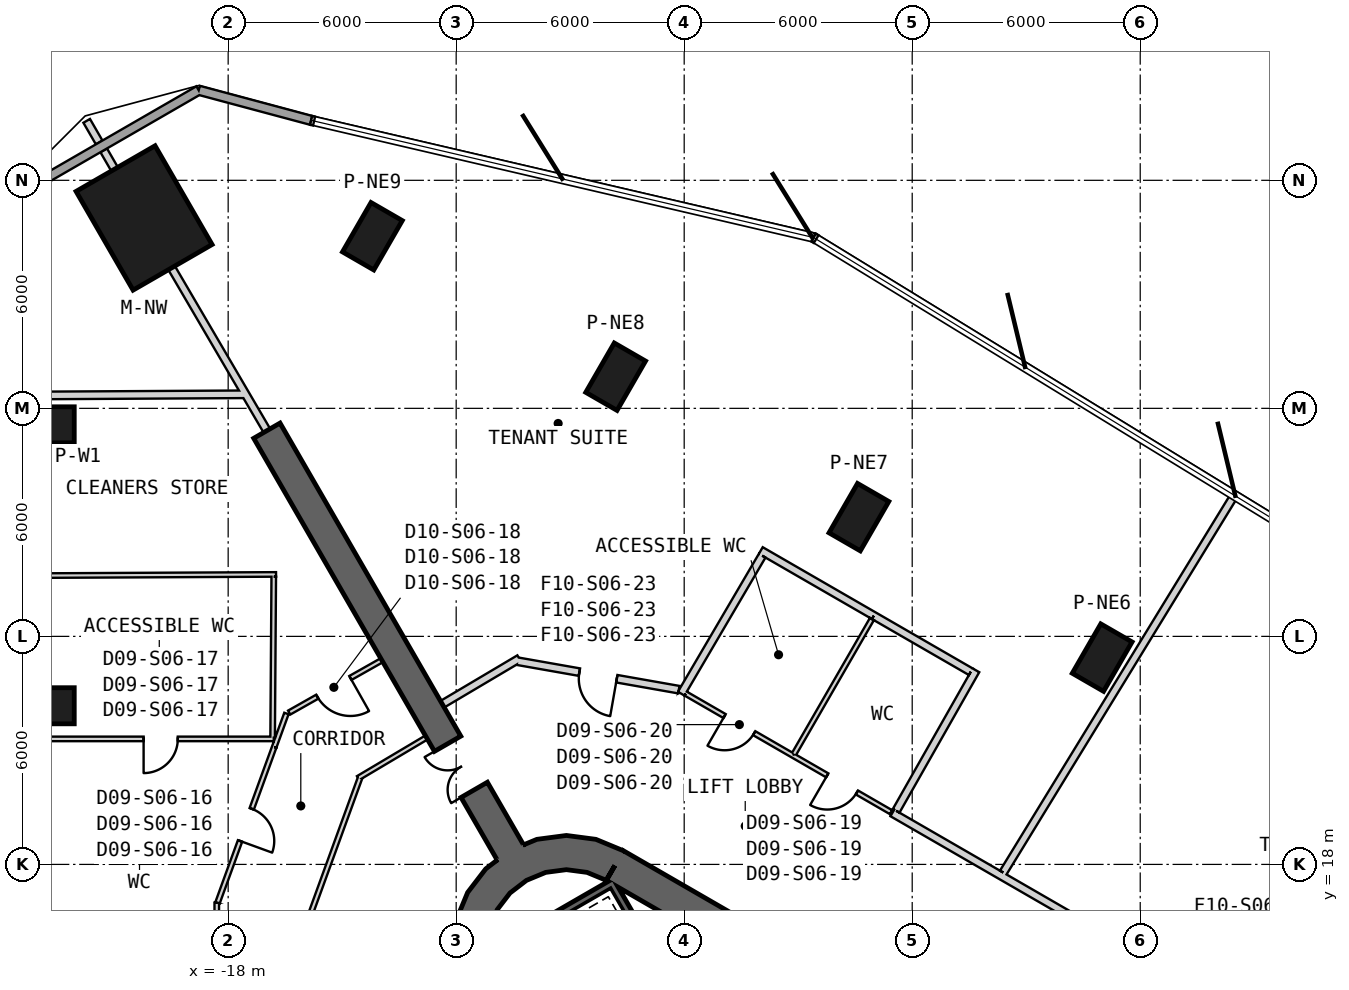
"""IFC4 building model, lengths in metres.
Left out: names, types, materials, properties, quantities, classifications, styles, units other than length and angle.
Written with IfcOpenShell. Run it as: python <this file> out.ifc"""

import sys

from ifc_helpers import new_model, si_unit, direction, frame, frame_2d, origin, origin_2d, place, context, subcontext, project, spatial, polyline, rectangle, outline, extrude, element, fill, save


model = new_model("IFC4")
c1 = context("Model", 3, precision=1e-05, world=origin(), true_north=direction((0.0, 1.0)))
c2 = subcontext(c1, "Body", "Model", "MODEL_VIEW")
j1 = project(units=[si_unit("LENGTHUNIT", "METRE"), si_unit("PLANEANGLEUNIT", "RADIAN")], contexts=[c1])
p1 = place(None, origin())
s1 = spatial("IfcSite", under=j1, at=p1, CompositionType="ELEMENT")
p2 = place(p1, origin())
s2 = spatial("IfcBuilding", under=s1, at=p2, CompositionType="ELEMENT")
p3 = place(p2, frame((0.0, 0.0, 119.3)))
s3 = spatial("IfcBuildingStorey", under=s2, at=p3, CompositionType="ELEMENT", Elevation=119.3)
p4 = place(p3, frame((-20.213, 35.01, 0.0), z_axis=(0.0, 0.0, 1.0), x_axis=(-0.5, 0.866025403784, 0.0)))
e1 = element("IfcColumn", 1, at=p4, inside=s3, PredefinedType="COLUMN", context=c2, shape_type="SweptSolid", body=[
    extrude(rectangle(XDim=3.0, YDim=2.4, at=origin_2d()), origin(), (0.0, 0.0, 1.0), 4.1),
])
for number, where, z_axis, x_axis in (
    (2, (-22.8, 29.566, 0.0), (0.0, 0.0, 1.0), (-1.0, 0.0, 0.0)),
    (3, (-22.8, 22.174, 0.0), (0.0, 0.0, 1.0), (-1.0, 0.0, 0.0)),
    (4, (4.999, 23.441, 0.0), (0.0, 0.0, 1.0), (0.5, 0.866, 0.0)),
    (5, (-1.402, 27.137, 0.0), (0.0, 0.0, 1.0), (0.5, 0.866, 0.0)),
    (6, (-7.803, 30.833, 0.0), (0.0, 0.0, 1.0), (0.5, 0.866, 0.0)),
    (7, (-14.205, 34.528, 0.0), (0.0, 0.0, 1.0), (0.5, 0.866, 0.0)),
):
    element("IfcColumn", number, at=place(p3, frame(where, z_axis=z_axis, x_axis=x_axis)), inside=s3, PredefinedType="COLUMN", context=c2, shape_type="SweptSolid", body=[
        extrude(rectangle(XDim=1.5, YDim=0.95, at=origin_2d()), origin(), (0.0, 0.0, 1.0), 4.1),
    ])
p5 = place(p3, frame((19.475, 2.208, 0.0), z_axis=(0.0, 0.0, 1.0), x_axis=(-0.866028369851, 0.499994862586, 0.0)))
e8 = element("IfcWall", 8, at=p5, inside=s3, PredefinedType="SHEAR", context=c2, shape_type="SweptSolid", body=[
    extrude(rectangle(XDim=31.523, YDim=0.9, at=frame_2d((15.762, 0.0))), origin(), (0.0, 0.0, 1.0), 4.1),
])
p6 = place(p5, frame((7.062, 0.0, 0.0)))
e9 = element("IfcOpeningElement", 9, at=p6, cuts=e8, PredefinedType="OPENING", context=c2, shape_type="SweptSolid", body=[
    extrude(rectangle(XDim=1.2, YDim=2.4, at=frame_2d((0.6, 1.2))), frame((0.0, 0.46, 0.0), z_axis=(0.0, -1.0, 0.0), x_axis=(1.0, 0.0, 0.0)), (0.0, 0.0, 1.0), 0.92),
])
p7 = place(p5, frame((9.762, 0.0, 0.0)))
e10 = element("IfcOpeningElement", 10, at=p7, cuts=e8, PredefinedType="OPENING", context=c2, shape_type="SweptSolid", body=[
    extrude(rectangle(XDim=1.2, YDim=2.4, at=frame_2d((0.6, 1.2))), frame((0.0, 0.46, 0.0), z_axis=(0.0, -1.0, 0.0), x_axis=(1.0, 0.0, 0.0)), (0.0, 0.0, 1.0), 0.92),
])
p8 = place(p5, frame((12.462, 0.0, 0.0)))
e11 = element("IfcOpeningElement", 11, at=p8, cuts=e8, PredefinedType="OPENING", context=c2, shape_type="SweptSolid", body=[
    extrude(rectangle(XDim=1.2, YDim=2.4, at=frame_2d((0.6, 1.2))), frame((0.0, 0.46, 0.0), z_axis=(0.0, -1.0, 0.0), x_axis=(1.0, 0.0, 0.0)), (0.0, 0.0, 1.0), 0.92),
])
p9 = place(p5, frame((15.162, 0.0, 0.0)))
e12 = element("IfcOpeningElement", 12, at=p9, cuts=e8, PredefinedType="OPENING", context=c2, shape_type="SweptSolid", body=[
    extrude(rectangle(XDim=1.2, YDim=2.4, at=frame_2d((0.6, 1.2))), frame((0.0, 0.46, 0.0), z_axis=(0.0, -1.0, 0.0), x_axis=(1.0, 0.0, 0.0)), (0.0, 0.0, 1.0), 0.92),
])
p10 = place(p5, frame((17.862, 0.0, 0.0)))
e13 = element("IfcOpeningElement", 13, at=p10, cuts=e8, PredefinedType="OPENING", context=c2, shape_type="SweptSolid", body=[
    extrude(rectangle(XDim=1.2, YDim=2.4, at=frame_2d((0.6, 1.2))), frame((0.0, 0.46, 0.0), z_axis=(0.0, -1.0, 0.0), x_axis=(1.0, 0.0, 0.0)), (0.0, 0.0, 1.0), 0.92),
])
p11 = place(p5, frame((20.562, 0.0, 0.0)))
e14 = element("IfcOpeningElement", 14, at=p11, cuts=e8, PredefinedType="OPENING", context=c2, shape_type="SweptSolid", body=[
    extrude(rectangle(XDim=1.2, YDim=2.4, at=frame_2d((0.6, 1.2))), frame((0.0, 0.46, 0.0), z_axis=(0.0, -1.0, 0.0), x_axis=(1.0, 0.0, 0.0)), (0.0, 0.0, 1.0), 0.92),
])
p12 = place(p5, frame((23.262, 0.0, 0.0)))
e15 = element("IfcOpeningElement", 15, at=p12, cuts=e8, PredefinedType="OPENING", context=c2, shape_type="SweptSolid", body=[
    extrude(rectangle(XDim=1.2, YDim=2.4, at=frame_2d((0.6, 1.2))), frame((0.0, 0.46, 0.0), z_axis=(0.0, -1.0, 0.0), x_axis=(1.0, 0.0, 0.0)), (0.0, 0.0, 1.0), 0.92),
])
p13 = place(p5, frame((3.612, 0.0, 0.0)))
e16 = element("IfcOpeningElement", 16, at=p13, cuts=e8, PredefinedType="OPENING", context=c2, shape_type="SweptSolid", body=[
    extrude(rectangle(XDim=1.2, YDim=2.4, at=frame_2d((0.6, 1.2))), frame((0.0, 0.46, 0.0), z_axis=(0.0, -1.0, 0.0), x_axis=(1.0, 0.0, 0.0)), (0.0, 0.0, 1.0), 0.92),
])
p14 = place(p5, frame((26.712, 0.0, 0.0)))
e17 = element("IfcOpeningElement", 17, at=p14, cuts=e8, PredefinedType="OPENING", context=c2, shape_type="SweptSolid", body=[
    extrude(rectangle(XDim=1.2, YDim=2.4, at=frame_2d((0.6, 1.2))), frame((0.0, 0.46, 0.0), z_axis=(0.0, -1.0, 0.0), x_axis=(1.0, 0.0, 0.0)), (0.0, 0.0, 1.0), 0.92),
])
p15 = place(p3, origin())
e18 = element("IfcWall", 18, at=p15, inside=s3, PredefinedType="SHEAR", context=c2, shape_type="SweptSolid", body=[
    extrude(outline(polyline([(-7.6, 18.36), (-8.323, 18.659), (-9.1, 18.762), (-9.876, 18.659), (-10.6, 18.36), (-11.221, 17.883), (-11.698, 17.262), (-11.998, 16.538), (-12.1, 15.762), (-11.2, 15.762), (-11.128, 16.305), (-10.919, 16.812), (-10.585, 17.247), (-10.15, 17.58), (-9.644, 17.79), (-9.1, 17.862), (-8.556, 17.79), (-8.05, 17.58), (-7.6, 18.36)])), origin(), (0.0, 0.0, 1.0), 4.1),
])
p16 = place(p3, frame((-10.575, 18.316, 0.0), z_axis=(0.0, 0.0, 1.0), x_axis=(-0.500008359956, 0.866020577108, 0.0)))
e19 = element("IfcWall", 19, at=p16, inside=s3, PredefinedType="SHEAR", context=c2, shape_type="SweptSolid", body=[
    extrude(rectangle(XDim=12.812, YDim=0.8, at=frame_2d((6.406, 0.0))), origin(), (0.0, 0.0, 1.0), 4.1),
])
p17 = place(p16, frame((1.9, 0.0, 0.0)))
e20 = element("IfcOpeningElement", 20, at=p17, cuts=e19, PredefinedType="OPENING", context=c2, shape_type="SweptSolid", body=[
    extrude(rectangle(XDim=1.4, YDim=2.4, at=frame_2d((0.7, 1.2))), frame((0.0, 0.41, 0.0), z_axis=(0.0, -1.0, 0.0), x_axis=(1.0, 0.0, 0.0)), (0.0, 0.0, 1.0), 0.82),
])
p18 = place(p3, frame((-15.817, 37.578, 0.0), z_axis=(0.0, 0.0, 1.0), x_axis=(-0.965920651814, 0.258838355735, 0.0)))
e21 = element("IfcWall", 21, at=p18, inside=s3, PredefinedType="SOLIDWALL", context=c2, shape_type="SweptSolid", body=[
    extrude(rectangle(XDim=3.063, YDim=0.24, at=frame_2d((1.531, 0.0))), origin(), (0.0, 0.0, 1.0), 3.8),
])
p19 = place(p3, frame((-18.775, 38.37, 0.0), z_axis=(0.0, 0.0, 1.0), x_axis=(-0.866031321059, -0.49998975084, 0.0)))
e22 = element("IfcWall", 22, at=p19, inside=s3, PredefinedType="SOLIDWALL", context=c2, shape_type="SweptSolid", body=[
    extrude(rectangle(XDim=5.851, YDim=0.24, at=frame_2d((2.925, 0.0))), origin(), (0.0, 0.0, 1.0), 3.8),
])
p20 = place(p3, frame((-7.818, 17.541, -0.3), z_axis=(0.0, 0.0, 1.0), x_axis=(-0.866044365799, -0.499967155389, 0.0)))
e23 = element("IfcWall", 23, at=p20, inside=s3, PredefinedType="SHEAR", context=c2, shape_type="SweptSolid", body=[
    extrude(rectangle(XDim=3.8, YDim=0.2, at=frame_2d((1.9, 0.0))), origin(), (0.0, 0.0, 1.0), 4.1),
])
p21 = place(p3, frame((-7.854, 17.405, -0.3), z_axis=(0.0, 0.0, 1.0), x_axis=(0.499997992926, -0.866026562566, 0.0)))
e24 = element("IfcWall", 24, at=p21, inside=s3, PredefinedType="SHEAR", context=c2, shape_type="SweptSolid", body=[
    extrude(rectangle(XDim=7.9, YDim=0.2, at=frame_2d((3.95, 0.0))), origin(), (0.0, 0.0, 1.0), 4.1),
])
p22 = place(p3, frame((-12.782, 21.339, 0.0), z_axis=(0.0, 0.0, 1.0), x_axis=(-0.859769901207, -0.510681619973, 0.0)))
e25 = element("IfcWall", 25, at=p22, inside=s3, PredefinedType="PARTITIONING", context=c2, shape_type="SweptSolid", body=[
    extrude(rectangle(XDim=2.093, YDim=0.12, at=frame_2d((1.046, 0.0))), origin(), (0.0, 0.0, 1.0), 3.8),
])
p23 = place(p3, frame((-14.528, 20.282, 0.0), z_axis=(0.0, 0.0, 1.0), x_axis=(-0.341969257767, -0.939711140054, 0.0)))
e26 = element("IfcWall", 26, at=p23, inside=s3, PredefinedType="PARTITIONING", context=c2, shape_type="SweptSolid", body=[
    extrude(rectangle(XDim=4.073, YDim=0.12, at=frame_2d((2.037, 0.0))), origin(), (0.0, 0.0, 1.0), 2.88),
])
p24 = place(p3, frame((-18.3, 16.994, 0.0), z_axis=(0.0, 0.0, 1.0), x_axis=(0.0, -1.0, 0.0)))
e27 = element("IfcWall", 27, at=p24, inside=s3, PredefinedType="PARTITIONING", context=c2, shape_type="SweptSolid", body=[
    extrude(rectangle(XDim=0.91, YDim=0.12, at=frame_2d((0.455, 0.0))), origin(), (0.0, 0.0, 1.0), 3.8),
])
p25 = place(p3, frame((-16.467, 21.97, 0.0), z_axis=(0.0, 0.0, 1.0), x_axis=(-0.341973086836, -0.939709746613, 0.0)))
e28 = element("IfcWall", 28, at=p25, inside=s3, PredefinedType="PARTITIONING", context=c2, shape_type="SweptSolid", body=[
    extrude(rectangle(XDim=0.937, YDim=0.12, at=frame_2d((0.469, 0.0))), origin(), (0.0, 0.0, 1.0), 2.88),
])
p26 = place(p3, frame((-16.788, 21.09, 0.0), z_axis=(0.0, 0.0, 1.0), x_axis=(-0.342035154905, -0.939687156882, 0.0)))
e29 = element("IfcWall", 29, at=p26, inside=s3, PredefinedType="PARTITIONING", context=c2, shape_type="SweptSolid", body=[
    extrude(rectangle(XDim=4.362, YDim=0.12, at=frame_2d((2.181, 0.0))), origin(), (0.0, 0.0, 1.0), 2.98),
])
p27 = place(p26, frame((1.731, 0.0, 0.0)))
e30 = element("IfcOpeningElement", 30, at=p27, cuts=e29, PredefinedType="OPENING", context=c2, shape_type="SweptSolid", body=[
    extrude(rectangle(XDim=0.9, YDim=2.1, at=frame_2d((0.45, 1.05))), frame((0.0, 0.07, 0.0), z_axis=(0.0, -1.0, 0.0), x_axis=(1.0, 0.0, 0.0)), (0.0, 0.0, 1.0), 0.14),
])
p28 = place(p3, frame((-13.956, 23.373, 0.0), z_axis=(0.0, 0.0, 1.0), x_axis=(-0.870551471841, -0.492077366757, 0.0)))
e31 = element("IfcWall", 31, at=p28, inside=s3, PredefinedType="PARTITIONING", context=c2, shape_type="SweptSolid", body=[
    extrude(rectangle(XDim=2.8, YDim=0.12, at=frame_2d((1.4, 0.0))), origin(), (0.0, 0.0, 1.0), 3.8),
])
p29 = place(p28, frame((0.95, 0.0, 0.0)))
e32 = element("IfcOpeningElement", 32, at=p29, cuts=e31, PredefinedType="OPENING", context=c2, shape_type="SweptSolid", body=[
    extrude(rectangle(XDim=1.0, YDim=2.1, at=frame_2d((0.5, 1.05))), frame((0.0, 0.07, 0.0), z_axis=(0.0, -1.0, 0.0), x_axis=(1.0, 0.0, 0.0)), (0.0, 0.0, 1.0), 0.14),
])
p30 = place(p3, frame((-10.339, 23.415, 0.0), z_axis=(0.0, 0.0, 1.0), x_axis=(-0.860316803263, -0.509759745393, 0.0)))
e33 = element("IfcWall", 33, at=p30, inside=s3, PredefinedType="PARTITIONING", context=c2, shape_type="SweptSolid", body=[
    extrude(rectangle(XDim=2.354, YDim=0.2, at=frame_2d((1.177, 0.0))), origin(), (0.0, 0.0, 1.0), 3.8),
])
p31 = place(p3, frame((-6.141, 22.598, 0.0), z_axis=(0.0, 0.0, 1.0), x_axis=(-0.984804622474, 0.173665930897, 0.0)))
e34 = element("IfcWall", 34, at=p31, inside=s3, PredefinedType="PARTITIONING", context=c2, shape_type="SweptSolid", body=[
    extrude(rectangle(XDim=4.316, YDim=0.2, at=frame_2d((2.158, 0.0))), origin(), (0.0, 0.0, 1.0), 2.88),
])
p32 = place(p31, frame((1.658, 0.0, 0.0)))
e35 = element("IfcOpeningElement", 35, at=p32, cuts=e34, PredefinedType="OPENING", context=c2, shape_type="SweptSolid", body=[
    extrude(rectangle(XDim=1.0, YDim=2.1, at=frame_2d((0.5, 1.05))), frame((0.0, 0.11, 0.0), z_axis=(0.0, -1.0, 0.0), x_axis=(1.0, 0.0, 0.0)), (0.0, 0.0, 1.0), 0.22),
])
p33 = place(p3, frame((22.727, 5.931, 0.0), z_axis=(0.0, 0.0, 1.0), x_axis=(-0.866024609098, 0.500001376435, 0.0)))
e36 = element("IfcWall", 36, at=p33, inside=s3, PredefinedType="PARTITIONING", context=c2, shape_type="SweptSolid", body=[
    extrude(rectangle(XDim=26.847, YDim=0.2, at=frame_2d((13.424, 0.0))), origin(), (0.0, 0.0, 1.0), 2.98),
])
p34 = place(p33, frame((16.578, 0.0, 0.0)))
e37 = element("IfcOpeningElement", 37, at=p34, cuts=e36, PredefinedType="OPENING", context=c2, shape_type="SweptSolid", body=[
    extrude(rectangle(XDim=1.0, YDim=2.1, at=frame_2d((0.5, 1.05))), frame((0.0, 0.11, 0.0), z_axis=(0.0, -1.0, 0.0), x_axis=(1.0, 0.0, 0.0)), (0.0, 0.0, 1.0), 0.22),
])
p35 = place(p33, frame((4.829, 0.0, 0.0)))
e38 = element("IfcOpeningElement", 38, at=p35, cuts=e36, PredefinedType="OPENING", context=c2, shape_type="SweptSolid", body=[
    extrude(rectangle(XDim=1.0, YDim=2.1, at=frame_2d((0.5, 1.05))), frame((0.0, 0.11, 0.0), z_axis=(0.0, -1.0, 0.0), x_axis=(1.0, 0.0, 0.0)), (0.0, 0.0, 1.0), 0.22),
])
p36 = place(p3, frame((-0.557, 19.375, 0.0), z_axis=(0.0, 0.0, 1.0), x_axis=(-0.866028486751, 0.499994660107, 0.0)))
e39 = element("IfcWall", 39, at=p36, inside=s3, PredefinedType="PARTITIONING", context=c2, shape_type="SweptSolid", body=[
    extrude(rectangle(XDim=2.976, YDim=0.12, at=frame_2d((1.488, 0.0))), origin(), (0.0, 0.0, 1.0), 3.08),
])
p37 = place(p36, frame((1.038, 0.0, 0.0)))
e40 = element("IfcOpeningElement", 40, at=p37, cuts=e39, PredefinedType="OPENING", context=c2, shape_type="SweptSolid", body=[
    extrude(rectangle(XDim=0.9, YDim=2.1, at=frame_2d((0.45, 1.05))), frame((0.0, 0.07, 0.0), z_axis=(0.0, -1.0, 0.0), x_axis=(1.0, 0.0, 0.0)), (0.0, 0.0, 1.0), 0.14),
])
p38 = place(p3, frame((-3.135, 20.863, 0.0), z_axis=(0.0, 0.0, 1.0), x_axis=(-0.866043587326, 0.49996850386, 0.0)))
e41 = element("IfcWall", 41, at=p38, inside=s3, PredefinedType="PARTITIONING", context=c2, shape_type="SweptSolid", body=[
    extrude(rectangle(XDim=3.264, YDim=0.12, at=frame_2d((1.632, 0.0))), origin(), (0.0, 0.0, 1.0), 2.98),
])
p39 = place(p38, frame((1.182, 0.0, 0.0)))
e42 = element("IfcOpeningElement", 42, at=p39, cuts=e41, PredefinedType="OPENING", context=c2, shape_type="SweptSolid", body=[
    extrude(rectangle(XDim=0.9, YDim=2.1, at=frame_2d((0.45, 1.05))), frame((0.0, 0.07, 0.0), z_axis=(0.0, -1.0, 0.0), x_axis=(1.0, 0.0, 0.0)), (0.0, 0.0, 1.0), 0.14),
])
p40 = place(p3, frame((-21.723, 37.565, 0.0), z_axis=(0.0, 0.0, 1.0), x_axis=(0.499862072928, -0.866105021373, 0.0)))
e43 = element("IfcWall", 43, at=p40, inside=s3, PredefinedType="PARTITIONING", context=c2, shape_type="SweptSolid", body=[
    extrude(rectangle(XDim=0.656, YDim=0.2, at=frame_2d((0.328, 0.0))), origin(), (0.0, 0.0, 1.0), 3.8),
])
p41 = place(p3, frame((-21.275, 36.789, 0.0), z_axis=(0.0, 0.0, 1.0), x_axis=(0.499857944771, -0.866107403877, 0.0)))
e44 = element("IfcWall", 44, at=p41, inside=s3, PredefinedType="PARTITIONING", context=c2, shape_type="SweptSolid", body=[
    extrude(rectangle(XDim=0.572, YDim=0.2, at=frame_2d((0.286, 0.0))), origin(), (0.0, 0.0, 1.0), 3.8),
])
p42 = place(p3, frame((-19.489, 33.696, 0.0), z_axis=(0.0, 0.0, 1.0), x_axis=(0.50520690072, -0.862998254613, 0.0)))
e45 = element("IfcWall", 45, at=p42, inside=s3, PredefinedType="PARTITIONING", context=c2, shape_type="SweptSolid", body=[
    extrude(rectangle(XDim=4.963, YDim=0.2, at=frame_2d((2.482, 0.0))), origin(), (0.0, 0.0, 1.0), 3.37),
])
p43 = place(p3, frame((-17.534, 30.37, 0.0), z_axis=(0.0, 0.0, 1.0), x_axis=(-0.999983869047, -0.00567993362, 0.0)))
e46 = element("IfcWall", 46, at=p43, inside=s3, PredefinedType="PARTITIONING", context=c2, shape_type="SweptSolid", body=[
    extrude(rectangle(XDim=5.416, YDim=0.2, at=frame_2d((2.708, 0.0))), origin(), (0.0, 0.0, 1.0), 3.37),
])
p44 = place(p3, frame((2.395, 17.785, 0.0), z_axis=(0.0, 0.0, 1.0), x_axis=(0.522409107214, 0.852694977527, 0.0)))
e47 = element("IfcWall", 47, at=p44, inside=s3, PredefinedType="PARTITIONING", context=c2, shape_type="SweptSolid", body=[
    extrude(rectangle(XDim=11.641, YDim=0.2, at=frame_2d((5.821, 0.0))), origin(), (0.0, 0.0, 1.0), 3.08),
])
p45 = place(p3, frame((-0.421, 19.411, 0.0), z_axis=(0.0, 0.0, 1.0), x_axis=(0.493854448618, 0.86954458401, 0.0)))
e48 = element("IfcWall", 48, at=p45, inside=s3, PredefinedType="PARTITIONING", context=c2, shape_type="SweptSolid", body=[
    extrude(rectangle(XDim=4.25, YDim=0.2, at=frame_2d((2.125, 0.0))), origin(), (0.0, 0.0, 1.0), 3.8),
])
p46 = place(p3, frame((-3.984, 26.26, 0.0), z_axis=(0.0, 0.0, 1.0), x_axis=(0.866016279763, -0.500015802937, 0.0)))
e49 = element("IfcWall", 49, at=p46, inside=s3, PredefinedType="PARTITIONING", context=c2, shape_type="SweptSolid", body=[
    extrude(rectangle(XDim=3.434, YDim=0.2, at=frame_2d((1.717, 0.0))), origin(), (0.0, 0.0, 1.0), 3.08),
])
p47 = place(p3, frame((-1.01, 24.543, 0.0), z_axis=(0.0, 0.0, 1.0), x_axis=(0.866036539348, -0.499980712142, 0.0)))
e50 = element("IfcWall", 50, at=p47, inside=s3, PredefinedType="PARTITIONING", context=c2, shape_type="SweptSolid", body=[
    extrude(rectangle(XDim=2.946, YDim=0.2, at=frame_2d((1.473, 0.0))), origin(), (0.0, 0.0, 1.0), 3.8),
])
p48 = place(p3, frame((-6.078, 22.493, 0.0), z_axis=(0.0, 0.0, 1.0), x_axis=(0.506079610092, 0.862486769898, 0.0)))
e51 = element("IfcWall", 51, at=p48, inside=s3, PredefinedType="PARTITIONING", context=c2, shape_type="SweptSolid", body=[
    extrude(rectangle(XDim=4.21, YDim=0.2, at=frame_2d((2.105, 0.0))), origin(), (0.0, 0.0, 1.0), 2.98),
])
p49 = place(p3, frame((-16.8, 21.302, 0.0), z_axis=(0.0, 0.0, 1.0), x_axis=(-1.0, 0.0, 0.0)))
e52 = element("IfcWall", 52, at=p49, inside=s3, PredefinedType="PARTITIONING", context=c2, shape_type="SweptSolid", body=[
    extrude(rectangle(XDim=5.95, YDim=0.12, at=frame_2d((2.975, 0.0))), origin(), (0.0, 0.0, 1.0), 2.98),
])
p50 = place(p49, frame((2.525, 0.0, 0.0)))
e53 = element("IfcOpeningElement", 53, at=p50, cuts=e52, PredefinedType="OPENING", context=c2, shape_type="SweptSolid", body=[
    extrude(rectangle(XDim=0.9, YDim=2.1, at=frame_2d((0.45, 1.05))), frame((0.0, 0.07, 0.0), z_axis=(0.0, -1.0, 0.0), x_axis=(1.0, 0.0, 0.0)), (0.0, 0.0, 1.0), 0.14),
])
p51 = place(p3, frame((-22.75, 25.6, 0.0), z_axis=(0.0, 0.0, 1.0), x_axis=(0.999987719631, 0.004955863907, 0.0)))
e54 = element("IfcWall", 54, at=p51, inside=s3, PredefinedType="PARTITIONING", context=c2, shape_type="SweptSolid", body=[
    extrude(rectangle(XDim=6.01, YDim=0.12, at=frame_2d((3.005, 0.0))), origin(), (0.0, 0.0, 1.0), 2.88),
])
p52 = place(p3, frame((-16.83, 21.332, 0.0), z_axis=(0.0, 0.0, 1.0), x_axis=(0.006971081403, 0.999975701717, 0.0)))
e55 = element("IfcWall", 55, at=p52, inside=s3, PredefinedType="PARTITIONING", context=c2, shape_type="SweptSolid", body=[
    extrude(rectangle(XDim=4.238, YDim=0.12, at=frame_2d((2.119, 0.0))), origin(), (0.0, 0.0, 1.0), 2.88),
])
p53 = place(p3, frame((-3.105, 20.914, 0.0), z_axis=(0.0, 0.0, 1.0), x_axis=(0.499965302165, 0.866045435662, 0.0)))
e56 = element("IfcWall", 56, at=p53, inside=s3, PredefinedType="PARTITIONING", context=c2, shape_type="SweptSolid", body=[
    extrude(rectangle(XDim=4.09, YDim=0.12, at=frame_2d((2.045, 0.0))), origin(), (0.0, 0.0, 1.0), 3.08),
])
p54 = place(p27, origin())
e57 = element("IfcDoor", 57, at=p54, inside=s3, OperationType="SINGLE_SWING_LEFT", PredefinedType="NOTDEFINED", context=c2, shape_type="SweptSolid", body=[
    extrude(rectangle(XDim=0.9, YDim=2.1, at=frame_2d((0.45, 1.05))), frame((0.0, 0.025, 0.0), z_axis=(0.0, -1.0, 0.0), x_axis=(1.0, 0.0, 0.0)), (0.0, 0.0, 1.0), 0.05),
])
fill(e30, e57)
p55 = place(p50, origin())
e58 = element("IfcDoor", 58, at=p55, inside=s3, OperationType="SINGLE_SWING_LEFT", PredefinedType="NOTDEFINED", context=c2, shape_type="SweptSolid", body=[
    extrude(rectangle(XDim=0.9, YDim=2.1, at=frame_2d((0.45, 1.05))), frame((0.0, 0.025, 0.0), z_axis=(0.0, -1.0, 0.0), x_axis=(1.0, 0.0, 0.0)), (0.0, 0.0, 1.0), 0.05),
])
fill(e53, e58)
p56 = place(p29, origin())
e59 = element("IfcDoor", 59, at=p56, inside=s3, OperationType="SINGLE_SWING_RIGHT", PredefinedType="NOTDEFINED", context=c2, shape_type="SweptSolid", body=[
    extrude(rectangle(XDim=1.0, YDim=2.1, at=frame_2d((0.5, 1.05))), frame((0.0, 0.025, 0.0), z_axis=(0.0, -1.0, 0.0), x_axis=(1.0, 0.0, 0.0)), (0.0, 0.0, 1.0), 0.05),
])
fill(e32, e59)
p57 = place(p37, origin())
e60 = element("IfcDoor", 60, at=p57, inside=s3, OperationType="SINGLE_SWING_RIGHT", PredefinedType="NOTDEFINED", context=c2, shape_type="SweptSolid", body=[
    extrude(rectangle(XDim=0.9, YDim=2.1, at=frame_2d((0.45, 1.05))), frame((0.0, 0.025, 0.0), z_axis=(0.0, -1.0, 0.0), x_axis=(1.0, 0.0, 0.0)), (0.0, 0.0, 1.0), 0.05),
])
fill(e40, e60)
p58 = place(p39, origin())
e61 = element("IfcDoor", 61, at=p58, inside=s3, OperationType="SINGLE_SWING_RIGHT", PredefinedType="NOTDEFINED", context=c2, shape_type="SweptSolid", body=[
    extrude(rectangle(XDim=0.9, YDim=2.1, at=frame_2d((0.45, 1.05))), frame((0.0, 0.025, 0.0), z_axis=(0.0, -1.0, 0.0), x_axis=(1.0, 0.0, 0.0)), (0.0, 0.0, 1.0), 0.05),
])
fill(e42, e61)
p59 = place(p32, origin())
e62 = element("IfcDoor", 62, at=p59, inside=s3, OperationType="SINGLE_SWING_RIGHT", PredefinedType="USERDEFINED", context=c2, shape_type="SweptSolid", body=[
    extrude(rectangle(XDim=1.0, YDim=2.1, at=frame_2d((0.5, 1.05))), frame((0.0, 0.025, 0.0), z_axis=(0.0, -1.0, 0.0), x_axis=(1.0, 0.0, 0.0)), (0.0, 0.0, 1.0), 0.05),
])
fill(e35, e62)
p60 = place(p17, origin())
e63 = element("IfcDoor", 63, at=p60, inside=s3, OperationType="DOUBLE_DOOR_SINGLE_SWING", PredefinedType="NOTDEFINED", context=c2, shape_type="SweptSolid", body=[
    extrude(rectangle(XDim=1.4, YDim=2.4, at=frame_2d((0.7, 1.2))), frame((0.0, 0.025, 0.0), z_axis=(0.0, -1.0, 0.0), x_axis=(1.0, 0.0, 0.0)), (0.0, 0.0, 1.0), 0.05),
])
fill(e20, e63)
save(model, sys.argv[1])
